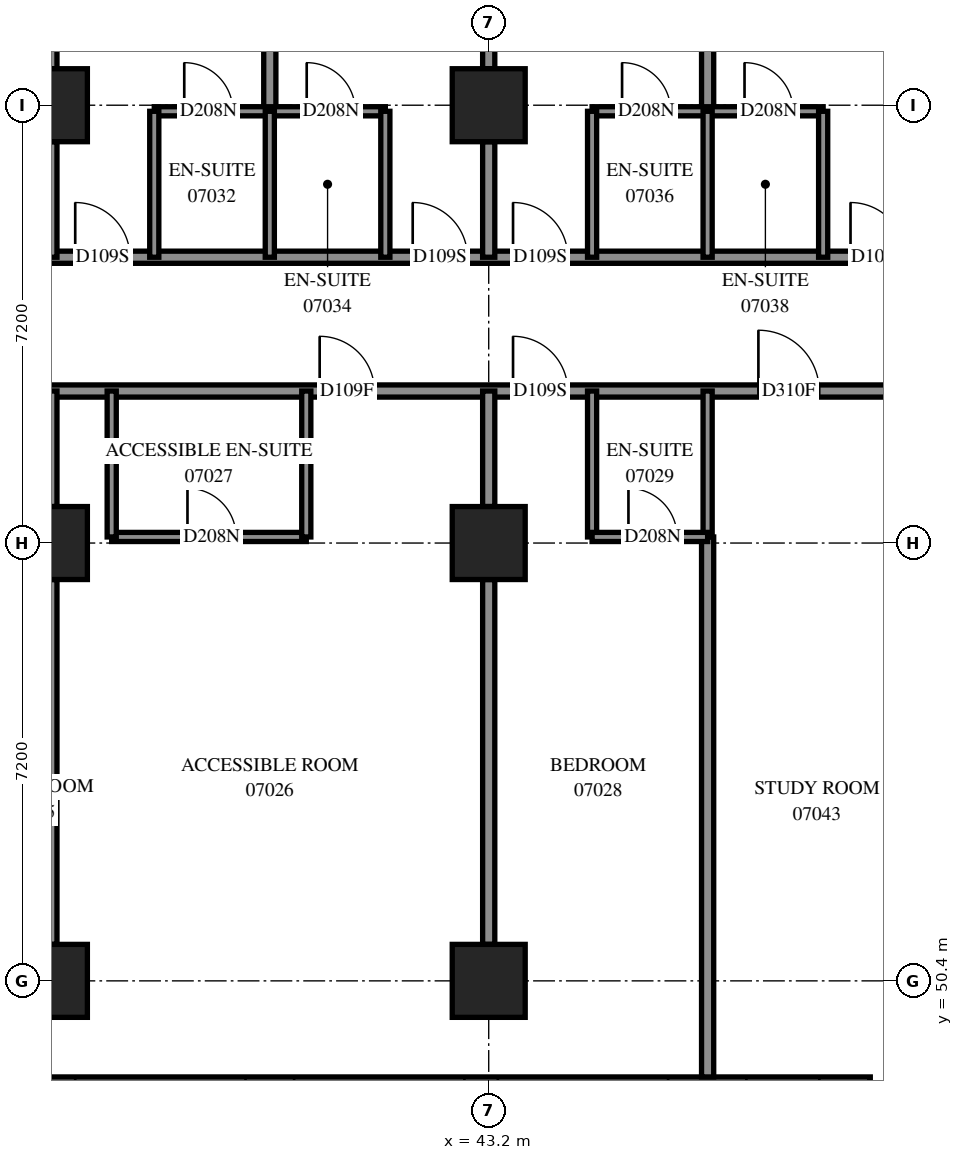
"""IFC4 building model, lengths in metres.
Left out: names, types, materials, properties, quantities, classifications, styles, units other than length and angle.
Written with IfcOpenShell. Run it as: python <this file> out.ifc"""

import sys

from ifc_helpers import new_model, si_unit, direction, frame, frame_2d, origin, origin_2d, place, context, subcontext, project, spatial, polyline, rectangle, outline, extrude, element, fill, save


model = new_model("IFC4")
c1 = context("Model", 3, precision=1e-05, world=origin(), true_north=direction((0.0, 1.0)))
c2 = subcontext(c1, "Body", "Model", "MODEL_VIEW")
j1 = project(units=[si_unit("LENGTHUNIT", "METRE"), si_unit("PLANEANGLEUNIT", "RADIAN")], contexts=[c1])
p1 = place(None, origin())
s1 = spatial("IfcSite", under=j1, at=p1, CompositionType="ELEMENT")
p2 = place(p1, origin())
s2 = spatial("IfcBuilding", under=s1, at=p2, CompositionType="ELEMENT")
p3 = place(p2, frame((0.0, 0.0, 30.4)))
s3 = spatial("IfcBuildingStorey", under=s2, at=p3, CompositionType="ELEMENT", Elevation=30.4)
for number, where, z_axis, x_axis in (
    (1, (36.0, 50.4, 0.0), (0.0, 0.0, 1.0), (1.0, 0.0, 0.0)),
    (2, (36.0, 57.6, 0.0), (0.0, 0.0, 1.0), (1.0, 0.0, 0.0)),
    (3, (36.0, 64.8, 0.0), (0.0, 0.0, 1.0), (1.0, 0.0, 0.0)),
    (4, (43.2, 50.4, 0.0), (0.0, 0.0, 1.0), (1.0, 0.0, 0.0)),
    (5, (43.2, 57.6, 0.0), (0.0, 0.0, 1.0), (1.0, 0.0, 0.0)),
    (6, (43.2, 64.8, 0.0), (0.0, 0.0, 1.0), (1.0, 0.0, 0.0)),
):
    element("IfcColumn", number, at=place(p3, frame(where, z_axis=z_axis, x_axis=x_axis)), inside=s3, PredefinedType="COLUMN", context=c2, shape_type="SweptSolid", body=[
        extrude(rectangle(XDim=1.2, YDim=1.2, at=origin_2d()), origin(), (0.0, 0.0, 1.0), 3.1),
    ])
p4 = place(p3, frame((35.075, 48.545, 0.0), z_axis=(0.0, 0.0, 1.0), x_axis=(1.0, 0.0, 0.0)))
e7 = element("IfcWall", 7, at=p4, inside=s3, PredefinedType="SOLIDWALL", context=c2, shape_type="SweptSolid", body=[
    extrude(outline(polyline([(-0.275, -0.275), (14.125, -0.275), (14.675, 0.275), (0.275, 0.275), (-0.275, -0.275)])), origin(), (0.0, 0.0, 1.0), 3.1),
])
p5 = place(p4, frame((1.325, 0.0, 0.5)))
e8 = element("IfcOpeningElement", 8, at=p5, cuts=e7, PredefinedType="OPENING", context=c2, shape_type="SweptSolid", body=[
    extrude(rectangle(XDim=2.8, YDim=2.45, at=frame_2d((1.4, 1.225))), frame((0.0, 0.285, 0.0), z_axis=(0.0, -1.0, 0.0), x_axis=(1.0, 0.0, 0.0)), (0.0, 0.0, 1.0), 0.57),
])
p6 = place(p4, frame((4.925, 0.0, 0.5)))
e9 = element("IfcOpeningElement", 9, at=p6, cuts=e7, PredefinedType="OPENING", context=c2, shape_type="SweptSolid", body=[
    extrude(rectangle(XDim=2.8, YDim=2.45, at=frame_2d((1.4, 1.225))), frame((0.0, 0.285, 0.0), z_axis=(0.0, -1.0, 0.0), x_axis=(1.0, 0.0, 0.0)), (0.0, 0.0, 1.0), 0.57),
])
p7 = place(p4, frame((8.275, 0.0, 0.5)))
e10 = element("IfcOpeningElement", 10, at=p7, cuts=e7, PredefinedType="OPENING", context=c2, shape_type="SweptSolid", body=[
    extrude(rectangle(XDim=2.8, YDim=2.45, at=frame_2d((1.4, 1.225))), frame((0.0, 0.285, 0.0), z_axis=(0.0, -1.0, 0.0), x_axis=(1.0, 0.0, 0.0)), (0.0, 0.0, 1.0), 0.57),
])
p8 = place(p4, frame((12.363, 0.0, 0.5)))
e11 = element("IfcOpeningElement", 11, at=p8, cuts=e7, PredefinedType="OPENING", context=c2, shape_type="SweptSolid", body=[
    extrude(rectangle(XDim=1.2, YDim=2.45, at=frame_2d((0.6, 1.225))), frame((0.0, 0.285, 0.0), z_axis=(0.0, -1.0, 0.0), x_axis=(1.0, 0.0, 0.0)), (0.0, 0.0, 1.0), 0.57),
])
p9 = place(p3, frame((49.475, 48.545, 0.0), z_axis=(0.0, 0.0, 1.0), x_axis=(0.0, -1.0, 0.0)))
e12 = element("IfcWall", 12, at=p9, inside=s3, PredefinedType="SOLIDWALL", context=c2, shape_type="SweptSolid", body=[
    extrude(outline(polyline([(0.275, -0.275), (7.475, -0.275), (6.755, 0.275), (-0.275, 0.275), (0.275, -0.275)])), origin(), (0.0, 0.0, 1.0), 3.1),
])
p10 = place(p9, frame((2.145, 0.0, 0.5)))
e13 = element("IfcOpeningElement", 13, at=p10, cuts=e12, PredefinedType="OPENING", context=c2, shape_type="SweptSolid", body=[
    extrude(rectangle(XDim=2.8, YDim=2.45, at=frame_2d((1.4, 1.225))), frame((0.0, 0.285, 0.0), z_axis=(0.0, -1.0, 0.0), x_axis=(1.0, 0.0, 0.0)), (0.0, 0.0, 1.0), 0.57),
])
p11 = place(p9, frame((0.372, 0.0, 0.5)))
e14 = element("IfcOpeningElement", 14, at=p11, cuts=e12, PredefinedType="OPENING", context=c2, shape_type="SweptSolid", body=[
    extrude(rectangle(XDim=1.2, YDim=2.45, at=frame_2d((0.6, 1.225))), frame((0.0, 0.285, 0.0), z_axis=(0.0, -1.0, 0.0), x_axis=(1.0, 0.0, 0.0)), (0.0, 0.0, 1.0), 0.57),
])
p12 = place(p3, frame((28.8, 60.1, 0.0), z_axis=(0.0, 0.0, 1.0), x_axis=(1.0, 0.0, 0.0)))
e15 = element("IfcWall", 15, at=p12, inside=s3, PredefinedType="PARTITIONING", context=c2, shape_type="SweptSolid", body=[
    extrude(rectangle(XDim=24.1, YDim=0.2, at=frame_2d((12.05, 0.0))), origin(), (0.0, 0.0, 1.0), 3.1),
])
p13 = place(p12, frame((4.125, 0.0, 0.0)))
e16 = element("IfcOpeningElement", 16, at=p13, cuts=e15, PredefinedType="OPENING", context=c2, shape_type="SweptSolid", body=[
    extrude(rectangle(XDim=1.0, YDim=2.1, at=frame_2d((0.5, 1.05))), frame((0.0, 0.11, 0.0), z_axis=(0.0, -1.0, 0.0), x_axis=(1.0, 0.0, 0.0)), (0.0, 0.0, 1.0), 0.22),
])
p14 = place(p12, frame((11.62, 0.0, 0.0)))
e17 = element("IfcOpeningElement", 17, at=p14, cuts=e15, PredefinedType="OPENING", context=c2, shape_type="SweptSolid", body=[
    extrude(rectangle(XDim=0.9, YDim=2.1, at=frame_2d((0.45, 1.05))), frame((0.0, 0.11, 0.0), z_axis=(0.0, -1.0, 0.0), x_axis=(1.0, 0.0, 0.0)), (0.0, 0.0, 1.0), 0.22),
])
p15 = place(p12, frame((14.8, 0.0, 0.0)))
e18 = element("IfcOpeningElement", 18, at=p15, cuts=e15, PredefinedType="OPENING", context=c2, shape_type="SweptSolid", body=[
    extrude(rectangle(XDim=0.9, YDim=2.1, at=frame_2d((0.45, 1.05))), frame((0.0, 0.11, 0.0), z_axis=(0.0, -1.0, 0.0), x_axis=(1.0, 0.0, 0.0)), (0.0, 0.0, 1.0), 0.22),
])
p16 = place(p12, frame((18.835, 0.0, 0.0)))
e19 = element("IfcOpeningElement", 19, at=p16, cuts=e15, PredefinedType="OPENING", context=c2, shape_type="SweptSolid", body=[
    extrude(rectangle(XDim=1.0, YDim=2.1, at=frame_2d((0.5, 1.05))), frame((0.0, 0.11, 0.0), z_axis=(0.0, -1.0, 0.0), x_axis=(1.0, 0.0, 0.0)), (0.0, 0.0, 1.0), 0.22),
])
p17 = place(p12, frame((22.854, 0.0, 0.0)))
e20 = element("IfcOpeningElement", 20, at=p17, cuts=e15, PredefinedType="OPENING", context=c2, shape_type="SweptSolid", body=[
    extrude(rectangle(XDim=1.0, YDim=2.1, at=frame_2d((0.5, 1.05))), frame((0.0, 0.11, 0.0), z_axis=(0.0, -1.0, 0.0), x_axis=(1.0, 0.0, 0.0)), (0.0, 0.0, 1.0), 0.22),
])
p18 = place(p3, frame((33.502, 62.3, 0.0), z_axis=(0.0, 0.0, 1.0), x_axis=(1.0, 0.0, 0.0)))
e21 = element("IfcWall", 21, at=p18, inside=s3, PredefinedType="PARTITIONING", context=c2, shape_type="SweptSolid", body=[
    extrude(rectangle(XDim=20.998, YDim=0.2, at=frame_2d((10.499, 0.0))), origin(), (0.0, 0.0, 1.0), 3.1),
])
p19 = place(p18, frame((2.898, 0.0, 0.0)))
e22 = element("IfcOpeningElement", 22, at=p19, cuts=e21, PredefinedType="OPENING", context=c2, shape_type="SweptSolid", body=[
    extrude(rectangle(XDim=0.9, YDim=2.1, at=frame_2d((0.45, 1.05))), frame((0.0, 0.11, 0.0), z_axis=(0.0, -1.0, 0.0), x_axis=(1.0, 0.0, 0.0)), (0.0, 0.0, 1.0), 0.22),
])
p20 = place(p18, frame((8.448, 0.0, 0.0)))
e23 = element("IfcOpeningElement", 23, at=p20, cuts=e21, PredefinedType="OPENING", context=c2, shape_type="SweptSolid", body=[
    extrude(rectangle(XDim=0.9, YDim=2.1, at=frame_2d((0.45, 1.05))), frame((0.0, 0.11, 0.0), z_axis=(0.0, -1.0, 0.0), x_axis=(1.0, 0.0, 0.0)), (0.0, 0.0, 1.0), 0.22),
])
p21 = place(p18, frame((10.098, 0.0, 0.0)))
e24 = element("IfcOpeningElement", 24, at=p21, cuts=e21, PredefinedType="OPENING", context=c2, shape_type="SweptSolid", body=[
    extrude(rectangle(XDim=0.9, YDim=2.1, at=frame_2d((0.45, 1.05))), frame((0.0, 0.11, 0.0), z_axis=(0.0, -1.0, 0.0), x_axis=(1.0, 0.0, 0.0)), (0.0, 0.0, 1.0), 0.22),
])
p22 = place(p18, frame((15.648, 0.0, 0.0)))
e25 = element("IfcOpeningElement", 25, at=p22, cuts=e21, PredefinedType="OPENING", context=c2, shape_type="SweptSolid", body=[
    extrude(rectangle(XDim=0.9, YDim=2.1, at=frame_2d((0.45, 1.05))), frame((0.0, 0.11, 0.0), z_axis=(0.0, -1.0, 0.0), x_axis=(1.0, 0.0, 0.0)), (0.0, 0.0, 1.0), 0.22),
])
p23 = place(p18, frame((17.298, 0.0, 0.0)))
e26 = element("IfcOpeningElement", 26, at=p23, cuts=e21, PredefinedType="OPENING", context=c2, shape_type="SweptSolid", body=[
    extrude(rectangle(XDim=0.9, YDim=2.1, at=frame_2d((0.45, 1.05))), frame((0.0, 0.11, 0.0), z_axis=(0.0, -1.0, 0.0), x_axis=(1.0, 0.0, 0.0)), (0.0, 0.0, 1.0), 0.22),
])
p24 = place(p3, frame((46.8, 48.82, 0.0), z_axis=(0.0, 0.0, 1.0), x_axis=(0.0, 1.0, 0.0)))
e27 = element("IfcWall", 27, at=p24, inside=s3, PredefinedType="PARTITIONING", context=c2, shape_type="SweptSolid", body=[
    extrude(rectangle(XDim=8.88, YDim=0.2, at=frame_2d((4.44, 0.0))), origin(), (0.0, 0.0, 1.0), 3.1),
])
p25 = place(p3, frame((39.6, 64.7, 0.0), z_axis=(0.0, 0.0, 1.0), x_axis=(0.0, 1.0, 0.0)))
e28 = element("IfcWall", 28, at=p25, inside=s3, PredefinedType="PARTITIONING", context=c2, shape_type="SweptSolid", body=[
    extrude(rectangle(XDim=8.052, YDim=0.2, at=frame_2d((4.026, 0.0))), origin(), (0.0, 0.0, 1.0), 3.1),
])
p26 = place(p3, frame((46.8, 64.7, 0.0), z_axis=(0.0, 0.0, 1.0), x_axis=(0.0, 1.0, 0.0)))
e29 = element("IfcWall", 29, at=p26, inside=s3, PredefinedType="PARTITIONING", context=c2, shape_type="SweptSolid", body=[
    extrude(rectangle(XDim=8.019, YDim=0.2, at=frame_2d((4.009, 0.0))), origin(), (0.0, 0.0, 1.0), 3.1),
])
p27 = place(p3, frame((36.0, 51.0, 0.0), z_axis=(0.0, 0.0, 1.0), x_axis=(0.0, 1.0, 0.0)))
e30 = element("IfcWall", 30, at=p27, inside=s3, PredefinedType="PARTITIONING", context=c2, shape_type="SweptSolid", body=[
    extrude(rectangle(XDim=6.0, YDim=0.2, at=frame_2d((3.0, 0.0))), origin(), (0.0, 0.0, 1.0), 2.6),
])
for number, where, z_axis, x_axis in (
    (31, (36.0, 65.4, 0.0), (0.0, 0.0, 1.0), (0.0, 1.0, 0.0)),
    (32, (43.2, 51.0, 0.0), (0.0, 0.0, 1.0), (0.0, 1.0, 0.0)),
    (33, (43.2, 65.4, 0.0), (0.0, 0.0, 1.0), (0.0, 1.0, 0.0)),
):
    element("IfcWall", number, at=place(p3, frame(where, z_axis=z_axis, x_axis=x_axis)), inside=s3, PredefinedType="PARTITIONING", context=c2, shape_type="SweptSolid", body=[
        extrude(rectangle(XDim=6.0, YDim=0.2, at=frame_2d((3.0, 0.0))), origin(), (0.0, 0.0, 1.0), 3.1),
    ])
p28 = place(p3, frame((44.9, 64.7, 0.0), z_axis=(0.0, 0.0, 1.0), x_axis=(1.0, 0.0, 0.0)))
e34 = element("IfcWall", 34, at=p28, inside=s3, PredefinedType="PARTITIONING", context=c2, shape_type="SweptSolid", body=[
    extrude(rectangle(XDim=3.8, YDim=0.15, at=frame_2d((1.9, 0.0))), origin(), (0.0, 0.0, 1.0), 3.1),
])
p29 = place(p28, frame((0.493, 0.0, 0.0)))
e35 = element("IfcOpeningElement", 35, at=p29, cuts=e34, PredefinedType="OPENING", context=c2, shape_type="SweptSolid", body=[
    extrude(rectangle(XDim=0.8, YDim=2.1, at=frame_2d((0.4, 1.05))), frame((0.0, 0.085, 0.0), z_axis=(0.0, -1.0, 0.0), x_axis=(1.0, 0.0, 0.0)), (0.0, 0.0, 1.0), 0.17),
])
p30 = place(p28, frame((2.507, 0.0, 0.0)))
e36 = element("IfcOpeningElement", 36, at=p30, cuts=e34, PredefinedType="OPENING", context=c2, shape_type="SweptSolid", body=[
    extrude(rectangle(XDim=0.8, YDim=2.1, at=frame_2d((0.4, 1.05))), frame((0.0, 0.085, 0.0), z_axis=(0.0, -1.0, 0.0), x_axis=(1.0, 0.0, 0.0)), (0.0, 0.0, 1.0), 0.17),
])
p31 = place(p3, frame((37.7, 64.7, 0.0), z_axis=(0.0, 0.0, 1.0), x_axis=(1.0, 0.0, 0.0)))
e37 = element("IfcWall", 37, at=p31, inside=s3, PredefinedType="PARTITIONING", context=c2, shape_type="SweptSolid", body=[
    extrude(rectangle(XDim=3.8, YDim=0.15, at=frame_2d((1.9, 0.0))), origin(), (0.0, 0.0, 1.0), 3.1),
])
p32 = place(p31, frame((0.493, 0.0, 0.0)))
e38 = element("IfcOpeningElement", 38, at=p32, cuts=e37, PredefinedType="OPENING", context=c2, shape_type="SweptSolid", body=[
    extrude(rectangle(XDim=0.8, YDim=2.1, at=frame_2d((0.4, 1.05))), frame((0.0, 0.085, 0.0), z_axis=(0.0, -1.0, 0.0), x_axis=(1.0, 0.0, 0.0)), (0.0, 0.0, 1.0), 0.17),
])
p33 = place(p31, frame((2.507, 0.0, 0.0)))
e39 = element("IfcOpeningElement", 39, at=p33, cuts=e37, PredefinedType="OPENING", context=c2, shape_type="SweptSolid", body=[
    extrude(rectangle(XDim=0.8, YDim=2.1, at=frame_2d((0.4, 1.05))), frame((0.0, 0.085, 0.0), z_axis=(0.0, -1.0, 0.0), x_axis=(1.0, 0.0, 0.0)), (0.0, 0.0, 1.0), 0.17),
])
p34 = place(p3, frame((37.0, 57.7, 0.0), z_axis=(0.0, 0.0, 1.0), x_axis=(1.0, 0.0, 0.0)))
e40 = element("IfcWall", 40, at=p34, inside=s3, PredefinedType="PARTITIONING", context=c2, shape_type="SweptSolid", body=[
    extrude(rectangle(XDim=3.2, YDim=0.15, at=frame_2d((1.6, 0.0))), origin(), (0.0, 0.0, 1.0), 3.1),
])
p35 = place(p34, frame((1.246, 0.0, 0.0)))
e41 = element("IfcOpeningElement", 41, at=p35, cuts=e40, PredefinedType="OPENING", context=c2, shape_type="SweptSolid", body=[
    extrude(rectangle(XDim=0.8, YDim=2.1, at=frame_2d((0.4, 1.05))), frame((0.0, 0.085, 0.0), z_axis=(0.0, -1.0, 0.0), x_axis=(1.0, 0.0, 0.0)), (0.0, 0.0, 1.0), 0.17),
])
for number, where, z_axis, x_axis in (
    (42, (37.7, 62.3, 0.0), (0.0, 0.0, 1.0), (0.0, 1.0, 0.0)),
    (43, (39.6, 62.3, 0.0), (0.0, 0.0, 1.0), (0.0, 1.0, 0.0)),
    (44, (41.5, 62.3, 0.0), (0.0, 0.0, 1.0), (0.0, 1.0, 0.0)),
    (45, (44.9, 62.3, 0.0), (0.0, 0.0, 1.0), (0.0, 1.0, 0.0)),
    (46, (46.8, 62.3, 0.0), (0.0, 0.0, 1.0), (0.0, 1.0, 0.0)),
    (47, (48.7, 62.3, 0.0), (0.0, 0.0, 1.0), (0.0, 1.0, 0.0)),
    (48, (40.2, 57.7, 0.0), (0.0, 0.0, 1.0), (0.0, 1.0, 0.0)),
    (49, (37.0, 57.7, 0.0), (0.0, 0.0, 1.0), (0.0, 1.0, 0.0)),
    (50, (44.9, 57.7, 0.0), (0.0, 0.0, 1.0), (0.0, 1.0, 0.0)),
    (51, (46.8, 57.7, 0.0), (0.0, 0.0, 1.0), (0.0, 1.0, 0.0)),
):
    element("IfcWall", number, at=place(p3, frame(where, z_axis=z_axis, x_axis=x_axis)), inside=s3, PredefinedType="PARTITIONING", context=c2, shape_type="SweptSolid", body=[
        extrude(rectangle(XDim=2.4, YDim=0.15, at=frame_2d((1.2, 0.0))), origin(), (0.0, 0.0, 1.0), 3.1),
    ])
for number, where, z_axis, x_axis in (
    (52, (36.0, 62.3, 0.0), (0.0, 0.0, 1.0), (0.0, 1.0, 0.0)),
    (53, (43.2, 62.3, 0.0), (0.0, 0.0, 1.0), (0.0, 1.0, 0.0)),
    (54, (36.0, 58.2, 0.0), (0.0, 0.0, 1.0), (0.0, 1.0, 0.0)),
):
    element("IfcWall", number, at=place(p3, frame(where, z_axis=z_axis, x_axis=x_axis)), inside=s3, PredefinedType="PARTITIONING", context=c2, shape_type="SweptSolid", body=[
        extrude(rectangle(XDim=1.9, YDim=0.2, at=frame_2d((0.95, 0.0))), origin(), (0.0, 0.0, 1.0), 3.1),
    ])
p36 = place(p3, frame((44.9, 57.7, 0.0), z_axis=(0.0, 0.0, 1.0), x_axis=(1.0, 0.0, 0.0)))
e55 = element("IfcWall", 55, at=p36, inside=s3, PredefinedType="PARTITIONING", context=c2, shape_type="SweptSolid", body=[
    extrude(rectangle(XDim=1.9, YDim=0.15, at=frame_2d((0.95, 0.0))), origin(), (0.0, 0.0, 1.0), 3.1),
])
p37 = place(p36, frame((0.598, 0.0, 0.0)))
e56 = element("IfcOpeningElement", 56, at=p37, cuts=e55, PredefinedType="OPENING", context=c2, shape_type="SweptSolid", body=[
    extrude(rectangle(XDim=0.8, YDim=2.1, at=frame_2d((0.4, 1.05))), frame((0.0, 0.085, 0.0), z_axis=(0.0, -1.0, 0.0), x_axis=(1.0, 0.0, 0.0)), (0.0, 0.0, 1.0), 0.17),
])
p38 = place(p3, frame((43.2, 58.2, 0.0), z_axis=(0.0, 0.0, 1.0), x_axis=(0.0, 1.0, 0.0)))
e57 = element("IfcWall", 57, at=p38, inside=s3, PredefinedType="PARTITIONING", context=c2, shape_type="SweptSolid", body=[
    extrude(rectangle(XDim=1.9, YDim=0.2, at=frame_2d((0.95, 0.0))), origin(), (0.0, 0.0, 1.0), 3.1),
])
p39 = place(p14, origin())
e58 = element("IfcDoor", 58, at=p39, inside=s3, OperationType="SINGLE_SWING_LEFT", PredefinedType="DOOR", context=c2, shape_type="SweptSolid", body=[
    extrude(rectangle(XDim=0.9, YDim=2.1, at=frame_2d((0.45, 1.05))), frame((0.0, 0.025, 0.0), z_axis=(0.0, -1.0, 0.0), x_axis=(1.0, 0.0, 0.0)), (0.0, 0.0, 1.0), 0.05),
])
fill(e17, e58)
p40 = place(p35, origin())
e59 = element("IfcDoor", 59, at=p40, inside=s3, OperationType="SINGLE_SWING_RIGHT", PredefinedType="DOOR", context=c2, shape_type="SweptSolid", body=[
    extrude(rectangle(XDim=0.8, YDim=2.1, at=frame_2d((0.4, 1.05))), frame((0.0, 0.025, 0.0), z_axis=(0.0, -1.0, 0.0), x_axis=(1.0, 0.0, 0.0)), (0.0, 0.0, 1.0), 0.05),
])
fill(e41, e59)
p41 = place(p15, origin())
e60 = element("IfcDoor", 60, at=p41, inside=s3, OperationType="SINGLE_SWING_LEFT", PredefinedType="DOOR", context=c2, shape_type="SweptSolid", body=[
    extrude(rectangle(XDim=0.9, YDim=2.1, at=frame_2d((0.45, 1.05))), frame((0.0, 0.025, 0.0), z_axis=(0.0, -1.0, 0.0), x_axis=(1.0, 0.0, 0.0)), (0.0, 0.0, 1.0), 0.05),
])
fill(e18, e60)
p42 = place(p37, origin())
e61 = element("IfcDoor", 61, at=p42, inside=s3, OperationType="SINGLE_SWING_RIGHT", PredefinedType="DOOR", context=c2, shape_type="SweptSolid", body=[
    extrude(rectangle(XDim=0.8, YDim=2.1, at=frame_2d((0.4, 1.05))), frame((0.0, 0.025, 0.0), z_axis=(0.0, -1.0, 0.0), x_axis=(1.0, 0.0, 0.0)), (0.0, 0.0, 1.0), 0.05),
])
fill(e56, e61)
p43 = place(p19, origin())
e62 = element("IfcDoor", 62, at=p43, inside=s3, OperationType="SINGLE_SWING_RIGHT", PredefinedType="DOOR", context=c2, shape_type="SweptSolid", body=[
    extrude(rectangle(XDim=0.9, YDim=2.1, at=frame_2d((0.45, 1.05))), frame((0.0, 0.025, 0.0), z_axis=(0.0, -1.0, 0.0), x_axis=(1.0, 0.0, 0.0)), (0.0, 0.0, 1.0), 0.05),
])
fill(e22, e62)
p44 = place(p32, origin())
e63 = element("IfcDoor", 63, at=p44, inside=s3, OperationType="SINGLE_SWING_RIGHT", PredefinedType="DOOR", context=c2, shape_type="SweptSolid", body=[
    extrude(rectangle(XDim=0.8, YDim=2.1, at=frame_2d((0.4, 1.05))), frame((0.0, 0.025, 0.0), z_axis=(0.0, -1.0, 0.0), x_axis=(1.0, 0.0, 0.0)), (0.0, 0.0, 1.0), 0.05),
])
fill(e38, e63)
p45 = place(p20, origin())
e64 = element("IfcDoor", 64, at=p45, inside=s3, OperationType="SINGLE_SWING_LEFT", PredefinedType="DOOR", context=c2, shape_type="SweptSolid", body=[
    extrude(rectangle(XDim=0.9, YDim=2.1, at=frame_2d((0.45, 1.05))), frame((0.0, 0.025, 0.0), z_axis=(0.0, -1.0, 0.0), x_axis=(1.0, 0.0, 0.0)), (0.0, 0.0, 1.0), 0.05),
])
fill(e23, e64)
p46 = place(p33, origin())
e65 = element("IfcDoor", 65, at=p46, inside=s3, OperationType="SINGLE_SWING_RIGHT", PredefinedType="DOOR", context=c2, shape_type="SweptSolid", body=[
    extrude(rectangle(XDim=0.8, YDim=2.1, at=frame_2d((0.4, 1.05))), frame((0.0, 0.025, 0.0), z_axis=(0.0, -1.0, 0.0), x_axis=(1.0, 0.0, 0.0)), (0.0, 0.0, 1.0), 0.05),
])
fill(e39, e65)
p47 = place(p21, origin())
e66 = element("IfcDoor", 66, at=p47, inside=s3, OperationType="SINGLE_SWING_RIGHT", PredefinedType="DOOR", context=c2, shape_type="SweptSolid", body=[
    extrude(rectangle(XDim=0.9, YDim=2.1, at=frame_2d((0.45, 1.05))), frame((0.0, 0.025, 0.0), z_axis=(0.0, -1.0, 0.0), x_axis=(1.0, 0.0, 0.0)), (0.0, 0.0, 1.0), 0.05),
])
fill(e24, e66)
p48 = place(p29, origin())
e67 = element("IfcDoor", 67, at=p48, inside=s3, OperationType="SINGLE_SWING_RIGHT", PredefinedType="DOOR", context=c2, shape_type="SweptSolid", body=[
    extrude(rectangle(XDim=0.8, YDim=2.1, at=frame_2d((0.4, 1.05))), frame((0.0, 0.025, 0.0), z_axis=(0.0, -1.0, 0.0), x_axis=(1.0, 0.0, 0.0)), (0.0, 0.0, 1.0), 0.05),
])
fill(e35, e67)
p49 = place(p22, origin())
e68 = element("IfcDoor", 68, at=p49, inside=s3, OperationType="SINGLE_SWING_LEFT", PredefinedType="DOOR", context=c2, shape_type="SweptSolid", body=[
    extrude(rectangle(XDim=0.9, YDim=2.1, at=frame_2d((0.45, 1.05))), frame((0.0, 0.025, 0.0), z_axis=(0.0, -1.0, 0.0), x_axis=(1.0, 0.0, 0.0)), (0.0, 0.0, 1.0), 0.05),
])
fill(e25, e68)
p50 = place(p30, origin())
e69 = element("IfcDoor", 69, at=p50, inside=s3, OperationType="SINGLE_SWING_RIGHT", PredefinedType="DOOR", context=c2, shape_type="SweptSolid", body=[
    extrude(rectangle(XDim=0.8, YDim=2.1, at=frame_2d((0.4, 1.05))), frame((0.0, 0.025, 0.0), z_axis=(0.0, -1.0, 0.0), x_axis=(1.0, 0.0, 0.0)), (0.0, 0.0, 1.0), 0.05),
])
fill(e36, e69)
p51 = place(p16, origin())
e70 = element("IfcDoor", 70, at=p51, inside=s3, OperationType="SINGLE_SWING_RIGHT", PredefinedType="DOOR", context=c2, shape_type="SweptSolid", body=[
    extrude(rectangle(XDim=1.0, YDim=2.1, at=frame_2d((0.5, 1.05))), frame((0.0, 0.025, 0.0), z_axis=(0.0, -1.0, 0.0), x_axis=(1.0, 0.0, 0.0)), (0.0, 0.0, 1.0), 0.05),
])
fill(e19, e70)
save(model, sys.argv[1])
